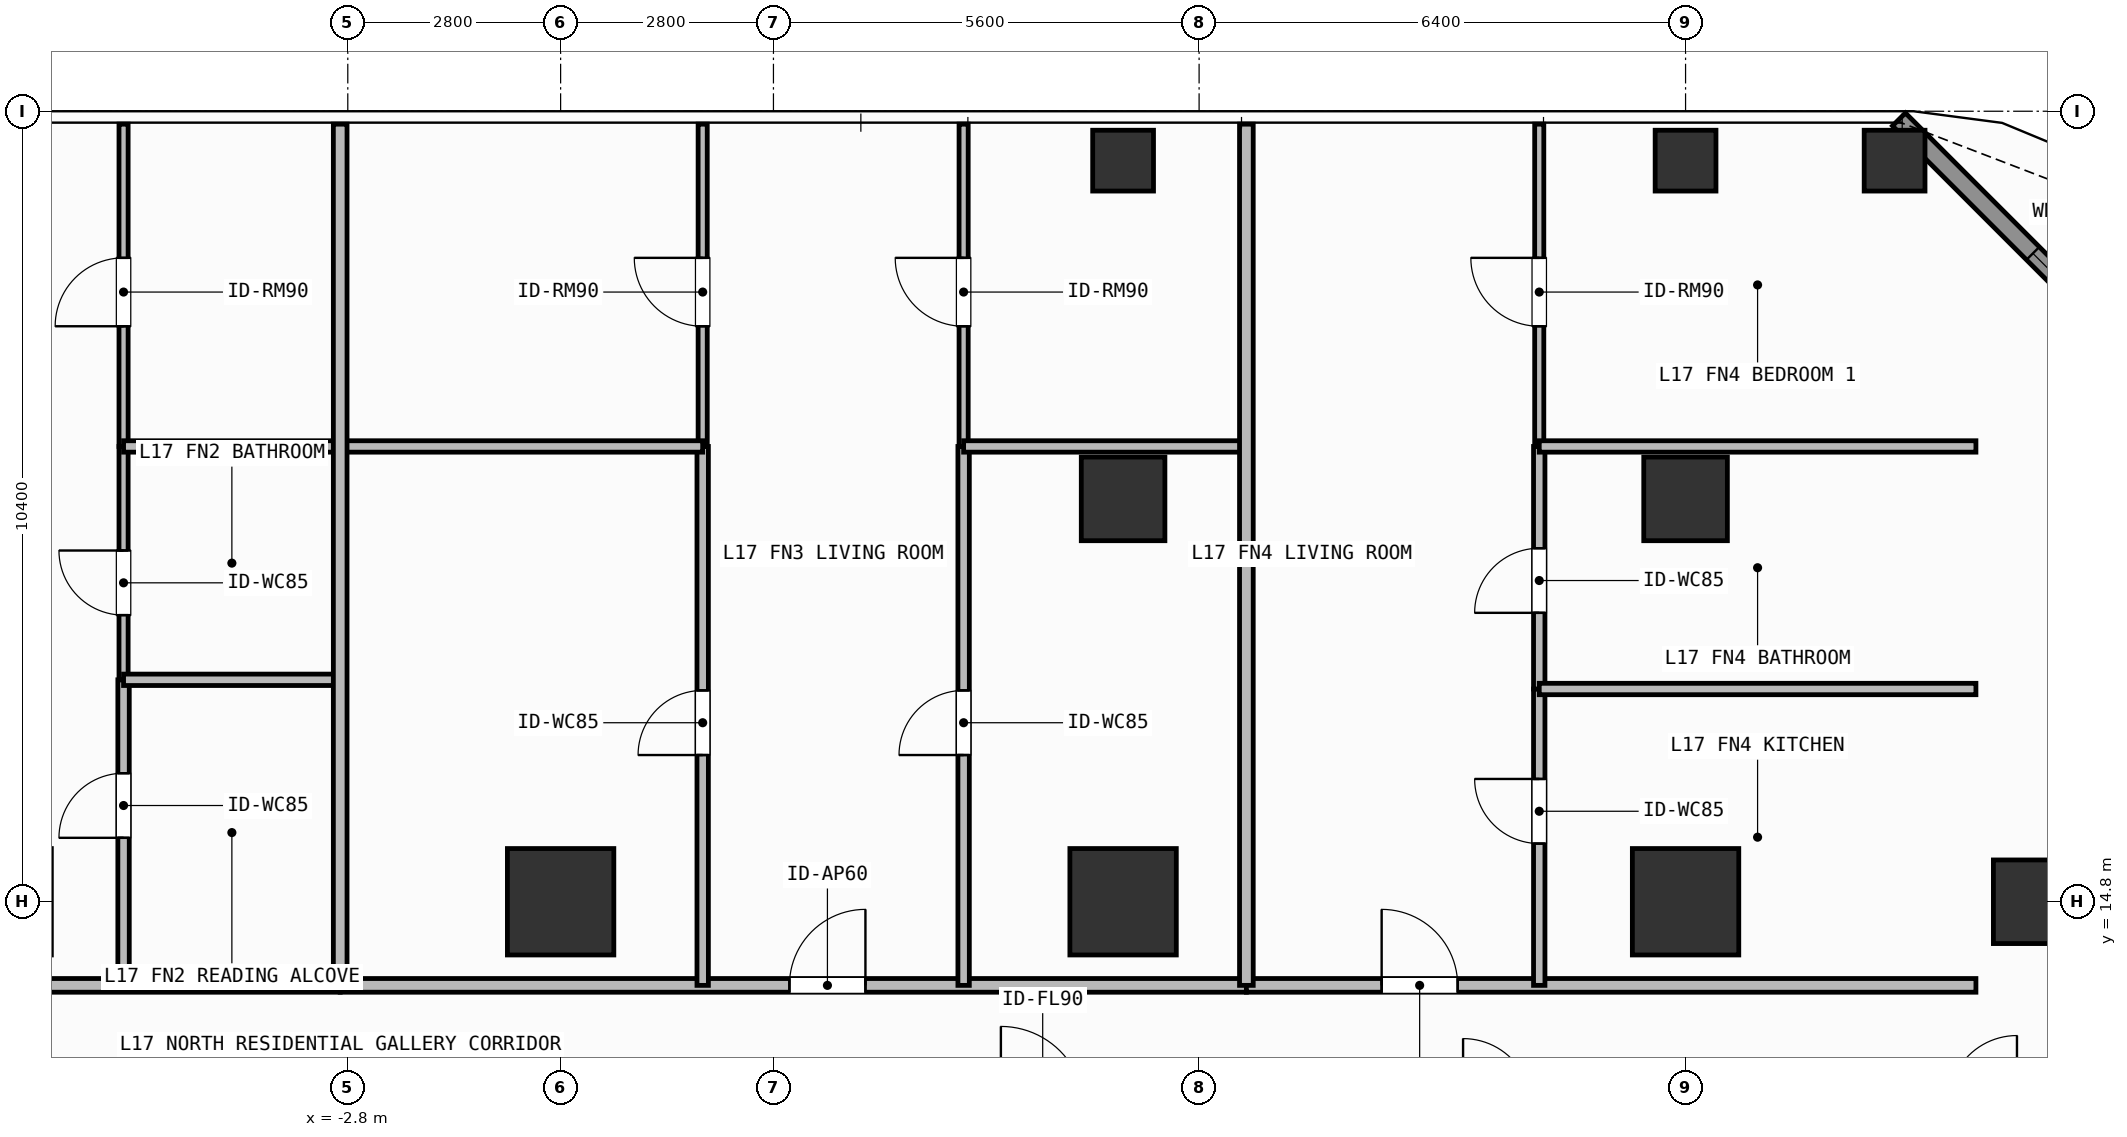
"""IFC4 building model, lengths in metres.
Left out: names, types, materials, properties, quantities, classifications, styles, units other than length and angle.
Written with IfcOpenShell. Run it as: python <this file> out.ifc"""

import sys

from ifc_helpers import new_model, si_unit, direction, frame, frame_2d, origin, origin_2d, place, context, subcontext, project, spatial, rectangle, hollow_rectangle, extrude, element, fill, save


model = new_model("IFC4")
c1 = context("Model", 3, precision=1e-05, world=origin(), true_north=direction((0.0, 1.0)))
c2 = subcontext(c1, "Body", "Model", "MODEL_VIEW")
j1 = project(units=[si_unit("LENGTHUNIT", "METRE"), si_unit("PLANEANGLEUNIT", "RADIAN")], contexts=[c1])
p1 = place(None, origin())
s1 = spatial("IfcSite", under=j1, at=p1, CompositionType="ELEMENT")
p2 = place(p1, origin())
s2 = spatial("IfcBuilding", under=s1, at=p2, CompositionType="ELEMENT")
p3 = place(p2, frame((0.0, 0.0, 65.7)))
s3 = spatial("IfcBuildingStorey", under=s2, at=p3, CompositionType="ELEMENT", Elevation=65.7)
for number, where, z_axis, x_axis in (
    (1, (0.0, 14.8, 0.0), (0.0, 0.0, 1.0), (1.0, 0.0, 0.0)),
    (2, (7.4, 14.8, 0.0), (0.0, 0.0, 1.0), (1.0, 0.0, 0.0)),
    (3, (14.8, 14.8, 0.0), (0.0, 0.0, 1.0), (1.0, 0.0, 0.0)),
):
    element("IfcColumn", number, at=place(p3, frame(where, z_axis=z_axis, x_axis=x_axis)), inside=s3, PredefinedType="COLUMN", context=c2, shape_type="SweptSolid", body=[
        extrude(rectangle(XDim=1.4, YDim=1.4, at=origin_2d()), origin(), (0.0, 0.0, 1.0), 3.9),
    ])
for number, where, z_axis, x_axis in (
    (4, (19.4, 14.8, 0.0), (0.0, 0.0, 1.0), (1.0, 0.0, 0.0)),
    (5, (7.4, 20.1, 0.0), (0.0, 0.0, 1.0), (1.0, 0.0, 0.0)),
    (6, (14.8, 20.1, 0.0), (0.0, 0.0, 1.0), (1.0, 0.0, 0.0)),
):
    element("IfcColumn", number, at=place(p3, frame(where, z_axis=z_axis, x_axis=x_axis)), inside=s3, PredefinedType="COLUMN", context=c2, shape_type="SweptSolid", body=[
        extrude(rectangle(XDim=1.1, YDim=1.1, at=origin_2d()), origin(), (0.0, 0.0, 1.0), 3.9),
    ])
for number, where, z_axis, x_axis in (
    (7, (17.55, 24.55, 0.0), (0.0, 0.0, 1.0), (1.0, 0.0, 0.0)),
    (8, (7.4, 24.55, 0.0), (0.0, 0.0, 1.0), (1.0, 0.0, 0.0)),
    (9, (14.8, 24.55, 0.0), (0.0, 0.0, 1.0), (1.0, 0.0, 0.0)),
):
    element("IfcColumn", number, at=place(p3, frame(where, z_axis=z_axis, x_axis=x_axis)), inside=s3, PredefinedType="COLUMN", context=c2, shape_type="SweptSolid", body=[
        extrude(hollow_rectangle(XDim=0.8, YDim=0.8, WallThickness=0.036, at=origin_2d()), origin(), (0.0, 0.0, 1.0), 3.9),
    ])
p4 = place(p3, frame((17.608, 25.092, 0.0), z_axis=(0.0, 0.0, 1.0), x_axis=(0.707106781187, -0.707106781187, 0.0)))
e10 = element("IfcWall", 10, at=p4, inside=s3, PredefinedType="SOLIDWALL", context=c2, shape_type="SweptSolid", body=[
    extrude(rectangle(XDim=6.484, YDim=0.24, at=frame_2d((3.242, 0.0))), origin(), (0.0, 0.0, 1.0), 3.68),
])
p5 = place(p4, frame((2.492, 0.0, 0.8)))
e11 = element("IfcOpeningElement", 11, at=p5, cuts=e10, PredefinedType="OPENING", context=c2, shape_type="SweptSolid", body=[
    extrude(rectangle(XDim=1.5, YDim=1.85, at=frame_2d((0.75, 0.925))), frame((0.0, 0.13, 0.0), z_axis=(0.0, -1.0, 0.0), x_axis=(1.0, 0.0, 0.0)), (0.0, 0.0, 1.0), 0.26),
])
p6 = place(p3, frame((-14.951, 13.7, 0.0), z_axis=(0.0, 0.0, 1.0), x_axis=(1.0, 0.0, 0.0)))
e12 = element("IfcWall", 12, at=p6, inside=s3, PredefinedType="PARTITIONING", context=c2, shape_type="SweptSolid", body=[
    extrude(rectangle(XDim=12.051, YDim=0.18, at=frame_2d((6.025, 0.0))), origin(), (0.0, 0.0, 1.0), 3.68),
])
p7 = place(p6, frame((5.704, 0.0, 0.0)))
e13 = element("IfcOpeningElement", 13, at=p7, cuts=e12, PredefinedType="OPENING", context=c2, shape_type="SweptSolid", body=[
    extrude(rectangle(XDim=1.0, YDim=2.2, at=frame_2d((0.5, 1.1))), frame((0.0, 0.1, 0.0), z_axis=(0.0, -1.0, 0.0), x_axis=(1.0, 0.0, 0.0)), (0.0, 0.0, 1.0), 0.2),
])
p8 = place(p3, frame((-5.75, 13.7, 0.0), z_axis=(0.0, 0.0, 1.0), x_axis=(0.0, 1.0, 0.0)))
e14 = element("IfcWall", 14, at=p8, inside=s3, PredefinedType="PARTITIONING", context=c2, shape_type="SweptSolid", body=[
    extrude(rectangle(XDim=4.02, YDim=0.15, at=frame_2d((2.01, 0.0))), origin(), (0.0, 0.0, 1.0), 3.68),
])
p9 = place(p8, frame((1.941, 0.0, 0.0)))
e15 = element("IfcOpeningElement", 15, at=p9, cuts=e14, PredefinedType="OPENING", context=c2, shape_type="SweptSolid", body=[
    extrude(rectangle(XDim=0.85, YDim=2.1, at=frame_2d((0.425, 1.05))), frame((0.0, 0.085, 0.0), z_axis=(0.0, -1.0, 0.0), x_axis=(1.0, 0.0, 0.0)), (0.0, 0.0, 1.0), 0.17),
])
p10 = place(p3, frame((-5.75, 17.72, 0.0), z_axis=(0.0, 0.0, 1.0), x_axis=(0.0, 1.0, 0.0)))
e16 = element("IfcWall", 16, at=p10, inside=s3, PredefinedType="PARTITIONING", context=c2, shape_type="SweptSolid", body=[
    extrude(rectangle(XDim=3.07, YDim=0.12, at=frame_2d((1.535, 0.0))), origin(), (0.0, 0.0, 1.0), 3.68),
])
p11 = place(p10, frame((0.851, 0.0, 0.0)))
e17 = element("IfcOpeningElement", 17, at=p11, cuts=e16, PredefinedType="OPENING", context=c2, shape_type="SweptSolid", body=[
    extrude(rectangle(XDim=0.85, YDim=2.1, at=frame_2d((0.425, 1.05))), frame((0.0, 0.07, 0.0), z_axis=(0.0, -1.0, 0.0), x_axis=(1.0, 0.0, 0.0)), (0.0, 0.0, 1.0), 0.14),
])
p12 = place(p3, frame((-5.75, 20.79, 0.0), z_axis=(0.0, 0.0, 1.0), x_axis=(0.0, 1.0, 0.0)))
e18 = element("IfcWall", 18, at=p12, inside=s3, PredefinedType="PARTITIONING", context=c2, shape_type="SweptSolid", body=[
    extrude(rectangle(XDim=4.24, YDim=0.12, at=frame_2d((2.12, 0.0))), origin(), (0.0, 0.0, 1.0), 3.68),
])
p13 = place(p12, frame((1.581, 0.0, 0.0)))
e19 = element("IfcOpeningElement", 19, at=p13, cuts=e18, PredefinedType="OPENING", context=c2, shape_type="SweptSolid", body=[
    extrude(rectangle(XDim=0.9, YDim=2.1, at=frame_2d((0.45, 1.05))), frame((0.0, 0.07, 0.0), z_axis=(0.0, -1.0, 0.0), x_axis=(1.0, 0.0, 0.0)), (0.0, 0.0, 1.0), 0.14),
])
p14 = place(p3, frame((-2.9, 13.7, 0.0), z_axis=(0.0, 0.0, 1.0), x_axis=(1.0, 0.0, 0.0)))
e20 = element("IfcWall", 20, at=p14, inside=s3, PredefinedType="PARTITIONING", context=c2, shape_type="SweptSolid", body=[
    extrude(rectangle(XDim=11.922, YDim=0.18, at=frame_2d((5.961, 0.0))), origin(), (0.0, 0.0, 1.0), 3.68),
])
p15 = place(p14, frame((5.91, 0.0, 0.0)))
e21 = element("IfcOpeningElement", 21, at=p15, cuts=e20, PredefinedType="OPENING", context=c2, shape_type="SweptSolid", body=[
    extrude(rectangle(XDim=1.0, YDim=2.2, at=frame_2d((0.5, 1.1))), frame((0.0, 0.1, 0.0), z_axis=(0.0, -1.0, 0.0), x_axis=(1.0, 0.0, 0.0)), (0.0, 0.0, 1.0), 0.2),
])
p16 = place(p3, frame((1.869, 13.7, 0.0), z_axis=(0.0, 0.0, 1.0), x_axis=(0.0, 1.0, 0.0)))
e22 = element("IfcWall", 22, at=p16, inside=s3, PredefinedType="PARTITIONING", context=c2, shape_type="SweptSolid", body=[
    extrude(rectangle(XDim=7.09, YDim=0.15, at=frame_2d((3.545, 0.0))), origin(), (0.0, 0.0, 1.0), 3.68),
])
p17 = place(p16, frame((3.03, 0.0, 0.0)))
e23 = element("IfcOpeningElement", 23, at=p17, cuts=e22, PredefinedType="OPENING", context=c2, shape_type="SweptSolid", body=[
    extrude(rectangle(XDim=0.85, YDim=2.1, at=frame_2d((0.425, 1.05))), frame((0.0, 0.085, 0.0), z_axis=(0.0, -1.0, 0.0), x_axis=(1.0, 0.0, 0.0)), (0.0, 0.0, 1.0), 0.17),
])
p18 = place(p3, frame((1.869, 20.79, 0.0), z_axis=(0.0, 0.0, 1.0), x_axis=(0.0, 1.0, 0.0)))
e24 = element("IfcWall", 24, at=p18, inside=s3, PredefinedType="PARTITIONING", context=c2, shape_type="SweptSolid", body=[
    extrude(rectangle(XDim=4.24, YDim=0.12, at=frame_2d((2.12, 0.0))), origin(), (0.0, 0.0, 1.0), 3.68),
])
p19 = place(p18, frame((1.581, 0.0, 0.0)))
e25 = element("IfcOpeningElement", 25, at=p19, cuts=e24, PredefinedType="OPENING", context=c2, shape_type="SweptSolid", body=[
    extrude(rectangle(XDim=0.9, YDim=2.1, at=frame_2d((0.45, 1.05))), frame((0.0, 0.07, 0.0), z_axis=(0.0, -1.0, 0.0), x_axis=(1.0, 0.0, 0.0)), (0.0, 0.0, 1.0), 0.14),
])
p20 = place(p3, frame((5.302, 13.7, 0.0), z_axis=(0.0, 0.0, 1.0), x_axis=(0.0, 1.0, 0.0)))
e26 = element("IfcWall", 26, at=p20, inside=s3, PredefinedType="PARTITIONING", context=c2, shape_type="SweptSolid", body=[
    extrude(rectangle(XDim=7.09, YDim=0.15, at=frame_2d((3.545, 0.0))), origin(), (0.0, 0.0, 1.0), 3.68),
])
p21 = place(p20, frame((3.03, 0.0, 0.0)))
e27 = element("IfcOpeningElement", 27, at=p21, cuts=e26, PredefinedType="OPENING", context=c2, shape_type="SweptSolid", body=[
    extrude(rectangle(XDim=0.85, YDim=2.1, at=frame_2d((0.425, 1.05))), frame((0.0, 0.085, 0.0), z_axis=(0.0, -1.0, 0.0), x_axis=(1.0, 0.0, 0.0)), (0.0, 0.0, 1.0), 0.17),
])
p22 = place(p3, frame((5.302, 20.79, 0.0), z_axis=(0.0, 0.0, 1.0), x_axis=(0.0, 1.0, 0.0)))
e28 = element("IfcWall", 28, at=p22, inside=s3, PredefinedType="PARTITIONING", context=c2, shape_type="SweptSolid", body=[
    extrude(rectangle(XDim=4.24, YDim=0.12, at=frame_2d((2.12, 0.0))), origin(), (0.0, 0.0, 1.0), 3.68),
])
p23 = place(p22, frame((1.581, 0.0, 0.0)))
e29 = element("IfcOpeningElement", 29, at=p23, cuts=e28, PredefinedType="OPENING", context=c2, shape_type="SweptSolid", body=[
    extrude(rectangle(XDim=0.9, YDim=2.1, at=frame_2d((0.45, 1.05))), frame((0.0, 0.07, 0.0), z_axis=(0.0, -1.0, 0.0), x_axis=(1.0, 0.0, 0.0)), (0.0, 0.0, 1.0), 0.14),
])
p24 = place(p3, frame((9.022, 13.7, 0.0), z_axis=(0.0, 0.0, 1.0), x_axis=(1.0, 0.0, 0.0)))
e30 = element("IfcWall", 30, at=p24, inside=s3, PredefinedType="PARTITIONING", context=c2, shape_type="SweptSolid", body=[
    extrude(rectangle(XDim=9.598, YDim=0.18, at=frame_2d((4.799, 0.0))), origin(), (0.0, 0.0, 1.0), 3.68),
])
p25 = place(p24, frame((1.78, 0.0, 0.0)))
e31 = element("IfcOpeningElement", 31, at=p25, cuts=e30, PredefinedType="OPENING", context=c2, shape_type="SweptSolid", body=[
    extrude(rectangle(XDim=1.0, YDim=2.2, at=frame_2d((0.5, 1.1))), frame((0.0, 0.1, 0.0), z_axis=(0.0, -1.0, 0.0), x_axis=(1.0, 0.0, 0.0)), (0.0, 0.0, 1.0), 0.2),
])
p26 = place(p3, frame((12.875, 13.7, 0.0), z_axis=(0.0, 0.0, 1.0), x_axis=(0.0, 1.0, 0.0)))
e32 = element("IfcWall", 32, at=p26, inside=s3, PredefinedType="PARTITIONING", context=c2, shape_type="SweptSolid", body=[
    extrude(rectangle(XDim=3.899, YDim=0.15, at=frame_2d((1.95, 0.0))), origin(), (0.0, 0.0, 1.0), 3.68),
])
p27 = place(p26, frame((1.865, 0.0, 0.0)))
e33 = element("IfcOpeningElement", 33, at=p27, cuts=e32, PredefinedType="OPENING", context=c2, shape_type="SweptSolid", body=[
    extrude(rectangle(XDim=0.85, YDim=2.1, at=frame_2d((0.425, 1.05))), frame((0.0, 0.085, 0.0), z_axis=(0.0, -1.0, 0.0), x_axis=(1.0, 0.0, 0.0)), (0.0, 0.0, 1.0), 0.17),
])
p28 = place(p3, frame((12.875, 17.599, 0.0), z_axis=(0.0, 0.0, 1.0), x_axis=(0.0, 1.0, 0.0)))
e34 = element("IfcWall", 34, at=p28, inside=s3, PredefinedType="PARTITIONING", context=c2, shape_type="SweptSolid", body=[
    extrude(rectangle(XDim=3.191, YDim=0.15, at=frame_2d((1.595, 0.0))), origin(), (0.0, 0.0, 1.0), 3.68),
])
p29 = place(p28, frame((1.002, 0.0, 0.0)))
e35 = element("IfcOpeningElement", 35, at=p29, cuts=e34, PredefinedType="OPENING", context=c2, shape_type="SweptSolid", body=[
    extrude(rectangle(XDim=0.85, YDim=2.1, at=frame_2d((0.425, 1.05))), frame((0.0, 0.085, 0.0), z_axis=(0.0, -1.0, 0.0), x_axis=(1.0, 0.0, 0.0)), (0.0, 0.0, 1.0), 0.17),
])
p30 = place(p3, frame((12.875, 20.79, 0.0), z_axis=(0.0, 0.0, 1.0), x_axis=(0.0, 1.0, 0.0)))
e36 = element("IfcWall", 36, at=p30, inside=s3, PredefinedType="PARTITIONING", context=c2, shape_type="SweptSolid", body=[
    extrude(rectangle(XDim=4.24, YDim=0.12, at=frame_2d((2.12, 0.0))), origin(), (0.0, 0.0, 1.0), 3.68),
])
p31 = place(p30, frame((1.581, 0.0, 0.0)))
e37 = element("IfcOpeningElement", 37, at=p31, cuts=e36, PredefinedType="OPENING", context=c2, shape_type="SweptSolid", body=[
    extrude(rectangle(XDim=0.9, YDim=2.1, at=frame_2d((0.45, 1.05))), frame((0.0, 0.07, 0.0), z_axis=(0.0, -1.0, 0.0), x_axis=(1.0, 0.0, 0.0)), (0.0, 0.0, 1.0), 0.14),
])
for number, where, z_axis, x_axis in (
    (38, (-5.75, 17.72, 0.0), (0.0, 0.0, 1.0), (1.0, 0.0, 0.0)),
    (39, (-5.75, 20.79, 0.0), (0.0, 0.0, 1.0), (1.0, 0.0, 0.0)),
):
    element("IfcWall", number, at=place(p3, frame(where, z_axis=z_axis, x_axis=x_axis)), inside=s3, PredefinedType="PARTITIONING", context=c2, shape_type="SweptSolid", body=[
        extrude(rectangle(XDim=2.85, YDim=0.15, at=frame_2d((1.425, 0.0))), origin(), (0.0, 0.0, 1.0), 3.68),
    ])
p32 = place(p3, frame((-2.9, 20.79, 0.0), z_axis=(0.0, 0.0, 1.0), x_axis=(1.0, 0.0, 0.0)))
e40 = element("IfcWall", 40, at=p32, inside=s3, PredefinedType="PARTITIONING", context=c2, shape_type="SweptSolid", body=[
    extrude(rectangle(XDim=4.769, YDim=0.15, at=frame_2d((2.384, 0.0))), origin(), (0.0, 0.0, 1.0), 3.68),
])
p33 = place(p3, frame((5.302, 20.79, 0.0), z_axis=(0.0, 0.0, 1.0), x_axis=(1.0, 0.0, 0.0)))
e41 = element("IfcWall", 41, at=p33, inside=s3, PredefinedType="PARTITIONING", context=c2, shape_type="SweptSolid", body=[
    extrude(rectangle(XDim=3.72, YDim=0.15, at=frame_2d((1.86, 0.0))), origin(), (0.0, 0.0, 1.0), 3.68),
])
p34 = place(p3, frame((-2.9, 13.7, 0.0), z_axis=(0.0, 0.0, 1.0), x_axis=(0.0, 1.0, 0.0)))
e42 = element("IfcWall", 42, at=p34, inside=s3, PredefinedType="PARTITIONING", context=c2, shape_type="SweptSolid", body=[
    extrude(rectangle(XDim=11.33, YDim=0.18, at=frame_2d((5.665, 0.0))), origin(), (0.0, 0.0, 1.0), 3.68),
])
for number, where, z_axis, x_axis in (
    (43, (12.875, 17.599, 0.0), (0.0, 0.0, 1.0), (1.0, 0.0, 0.0)),
    (44, (12.875, 20.79, 0.0), (0.0, 0.0, 1.0), (1.0, 0.0, 0.0)),
):
    element("IfcWall", number, at=place(p3, frame(where, z_axis=z_axis, x_axis=x_axis)), inside=s3, PredefinedType="PARTITIONING", context=c2, shape_type="SweptSolid", body=[
        extrude(rectangle(XDim=5.745, YDim=0.15, at=frame_2d((2.873, 0.0))), origin(), (0.0, 0.0, 1.0), 3.68),
    ])
p35 = place(p3, frame((9.022, 13.7, 0.0), z_axis=(0.0, 0.0, 1.0), x_axis=(0.0, 1.0, 0.0)))
e45 = element("IfcWall", 45, at=p35, inside=s3, PredefinedType="PARTITIONING", context=c2, shape_type="SweptSolid", body=[
    extrude(rectangle(XDim=11.33, YDim=0.18, at=frame_2d((5.665, 0.0))), origin(), (0.0, 0.0, 1.0), 3.68),
])
p36 = place(p5, origin())
e46 = element("IfcWindow", 46, at=p36, inside=s3, PartitioningType="SINGLE_PANEL", PredefinedType="WINDOW", context=c2, shape_type="SweptSolid", body=[
    extrude(rectangle(XDim=1.5, YDim=1.85, at=frame_2d((0.75, 0.925))), frame((0.0, 0.03, 0.0), z_axis=(0.0, -1.0, 0.0), x_axis=(1.0, 0.0, 0.0)), (0.0, 0.0, 1.0), 0.06),
])
fill(e11, e46)
p37 = place(p9, origin())
e47 = element("IfcDoor", 47, at=p37, inside=s3, OperationType="SINGLE_SWING_LEFT", PredefinedType="DOOR", context=c2, shape_type="SweptSolid", body=[
    extrude(rectangle(XDim=0.85, YDim=2.1, at=frame_2d((0.425, 1.05))), frame((0.0, 0.025, 0.0), z_axis=(0.0, -1.0, 0.0), x_axis=(1.0, 0.0, 0.0)), (0.0, 0.0, 1.0), 0.05),
])
fill(e15, e47)
p38 = place(p11, origin())
e48 = element("IfcDoor", 48, at=p38, inside=s3, OperationType="SINGLE_SWING_RIGHT", PredefinedType="DOOR", context=c2, shape_type="SweptSolid", body=[
    extrude(rectangle(XDim=0.85, YDim=2.1, at=frame_2d((0.425, 1.05))), frame((0.0, 0.025, 0.0), z_axis=(0.0, -1.0, 0.0), x_axis=(1.0, 0.0, 0.0)), (0.0, 0.0, 1.0), 0.05),
])
fill(e17, e48)
p39 = place(p13, origin())
e49 = element("IfcDoor", 49, at=p39, inside=s3, OperationType="SINGLE_SWING_LEFT", PredefinedType="DOOR", context=c2, shape_type="SweptSolid", body=[
    extrude(rectangle(XDim=0.9, YDim=2.1, at=frame_2d((0.45, 1.05))), frame((0.0, 0.025, 0.0), z_axis=(0.0, -1.0, 0.0), x_axis=(1.0, 0.0, 0.0)), (0.0, 0.0, 1.0), 0.05),
])
fill(e19, e49)
p40 = place(p15, origin())
e50 = element("IfcDoor", 50, at=p40, inside=s3, OperationType="SINGLE_SWING_RIGHT", PredefinedType="DOOR", context=c2, shape_type="SweptSolid", body=[
    extrude(rectangle(XDim=1.0, YDim=2.2, at=frame_2d((0.5, 1.1))), frame((0.0, 0.025, 0.0), z_axis=(0.0, -1.0, 0.0), x_axis=(1.0, 0.0, 0.0)), (0.0, 0.0, 1.0), 0.05),
])
fill(e21, e50)
p41 = place(p17, origin())
e51 = element("IfcDoor", 51, at=p41, inside=s3, OperationType="SINGLE_SWING_LEFT", PredefinedType="DOOR", context=c2, shape_type="SweptSolid", body=[
    extrude(rectangle(XDim=0.85, YDim=2.1, at=frame_2d((0.425, 1.05))), frame((0.0, 0.025, 0.0), z_axis=(0.0, -1.0, 0.0), x_axis=(1.0, 0.0, 0.0)), (0.0, 0.0, 1.0), 0.05),
])
fill(e23, e51)
p42 = place(p19, origin())
e52 = element("IfcDoor", 52, at=p42, inside=s3, OperationType="SINGLE_SWING_RIGHT", PredefinedType="DOOR", context=c2, shape_type="SweptSolid", body=[
    extrude(rectangle(XDim=0.9, YDim=2.1, at=frame_2d((0.45, 1.05))), frame((0.0, 0.025, 0.0), z_axis=(0.0, -1.0, 0.0), x_axis=(1.0, 0.0, 0.0)), (0.0, 0.0, 1.0), 0.05),
])
fill(e25, e52)
p43 = place(p21, origin())
e53 = element("IfcDoor", 53, at=p43, inside=s3, OperationType="SINGLE_SWING_LEFT", PredefinedType="DOOR", context=c2, shape_type="SweptSolid", body=[
    extrude(rectangle(XDim=0.85, YDim=2.1, at=frame_2d((0.425, 1.05))), frame((0.0, 0.025, 0.0), z_axis=(0.0, -1.0, 0.0), x_axis=(1.0, 0.0, 0.0)), (0.0, 0.0, 1.0), 0.05),
])
fill(e27, e53)
p44 = place(p23, origin())
e54 = element("IfcDoor", 54, at=p44, inside=s3, OperationType="SINGLE_SWING_RIGHT", PredefinedType="DOOR", context=c2, shape_type="SweptSolid", body=[
    extrude(rectangle(XDim=0.9, YDim=2.1, at=frame_2d((0.45, 1.05))), frame((0.0, 0.025, 0.0), z_axis=(0.0, -1.0, 0.0), x_axis=(1.0, 0.0, 0.0)), (0.0, 0.0, 1.0), 0.05),
])
fill(e29, e54)
p45 = place(p25, origin())
e55 = element("IfcDoor", 55, at=p45, inside=s3, OperationType="SINGLE_SWING_LEFT", PredefinedType="DOOR", context=c2, shape_type="SweptSolid", body=[
    extrude(rectangle(XDim=1.0, YDim=2.2, at=frame_2d((0.5, 1.1))), frame((0.0, 0.025, 0.0), z_axis=(0.0, -1.0, 0.0), x_axis=(1.0, 0.0, 0.0)), (0.0, 0.0, 1.0), 0.05),
])
fill(e31, e55)
p46 = place(p27, origin())
e56 = element("IfcDoor", 56, at=p46, inside=s3, OperationType="SINGLE_SWING_RIGHT", PredefinedType="DOOR", context=c2, shape_type="SweptSolid", body=[
    extrude(rectangle(XDim=0.85, YDim=2.1, at=frame_2d((0.425, 1.05))), frame((0.0, 0.025, 0.0), z_axis=(0.0, -1.0, 0.0), x_axis=(1.0, 0.0, 0.0)), (0.0, 0.0, 1.0), 0.05),
])
fill(e33, e56)
p47 = place(p29, origin())
e57 = element("IfcDoor", 57, at=p47, inside=s3, OperationType="SINGLE_SWING_LEFT", PredefinedType="DOOR", context=c2, shape_type="SweptSolid", body=[
    extrude(rectangle(XDim=0.85, YDim=2.1, at=frame_2d((0.425, 1.05))), frame((0.0, 0.025, 0.0), z_axis=(0.0, -1.0, 0.0), x_axis=(1.0, 0.0, 0.0)), (0.0, 0.0, 1.0), 0.05),
])
fill(e35, e57)
p48 = place(p31, origin())
e58 = element("IfcDoor", 58, at=p48, inside=s3, OperationType="SINGLE_SWING_RIGHT", PredefinedType="DOOR", context=c2, shape_type="SweptSolid", body=[
    extrude(rectangle(XDim=0.9, YDim=2.1, at=frame_2d((0.45, 1.05))), frame((0.0, 0.025, 0.0), z_axis=(0.0, -1.0, 0.0), x_axis=(1.0, 0.0, 0.0)), (0.0, 0.0, 1.0), 0.05),
])
fill(e37, e58)
save(model, sys.argv[1])
